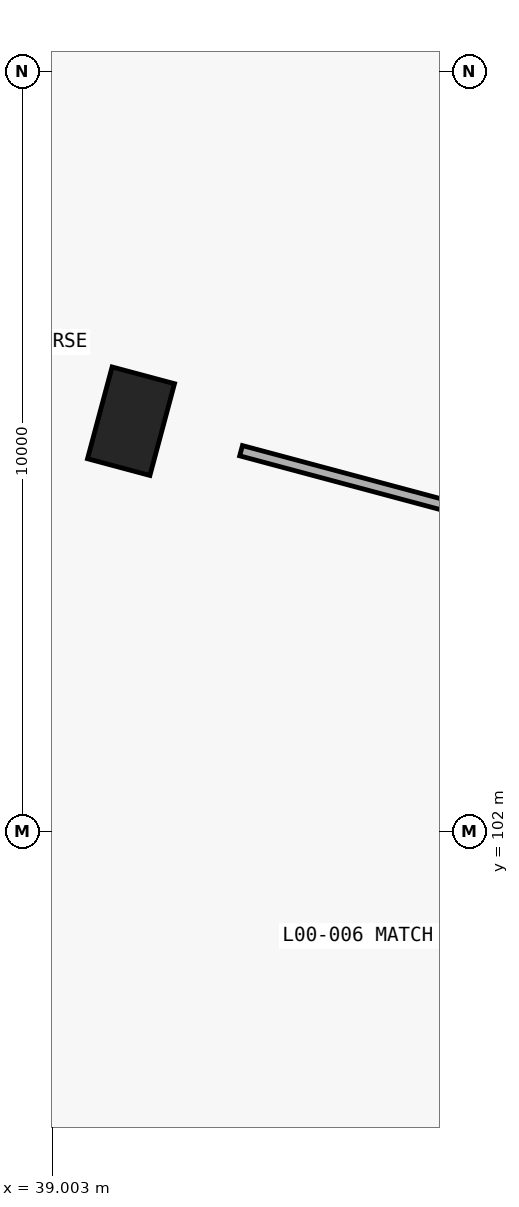
"""IFC4 building model, lengths in metres.
Left out: names, types, materials, properties, quantities, classifications, styles, units other than length and angle.
Written with IfcOpenShell. Run it as: python <this file> out.ifc"""

import sys

from ifc_helpers import new_model, si_unit, direction, frame, frame_2d, origin, origin_2d, place, context, subcontext, project, spatial, rectangle, extrude, element, save


model = new_model("IFC4")
c1 = context("Model", 3, precision=1e-05, world=origin(), true_north=direction((0.0, 1.0)))
c2 = subcontext(c1, "Body", "Model", "MODEL_VIEW")
j1 = project(units=[si_unit("LENGTHUNIT", "METRE"), si_unit("PLANEANGLEUNIT", "RADIAN")], contexts=[c1])
p1 = place(None, origin())
s1 = spatial("IfcSite", under=j1, at=p1, CompositionType="ELEMENT")
p2 = place(p1, origin())
s2 = spatial("IfcBuilding", under=s1, at=p2, CompositionType="ELEMENT")
p3 = place(p2, origin())
s3 = spatial("IfcBuildingStorey", under=s2, at=p3, CompositionType="ELEMENT", Elevation=0.0)
p4 = place(p3, frame((40.039, 107.4, 0.0), z_axis=(0.0, 0.0, 1.0), x_axis=(-0.965925826289, 0.258819045103, 0.0)))
e1 = element("IfcColumn", 1, at=p4, inside=s3, PredefinedType="COLUMN", context=c2, shape_type="SweptSolid", body=[
    extrude(rectangle(XDim=0.85, YDim=1.25, at=origin_2d()), origin(), (0.0, 0.0, 1.0), 5.4),
])
p5 = place(p3, frame((52.402, 104.087, 0.0), z_axis=(0.0, 0.0, 1.0), x_axis=(-0.965917575353, 0.258849836054, 0.0)))
e2 = element("IfcWall", 2, at=p5, inside=s3, PredefinedType="PARTITIONING", context=c2, shape_type="SweptSolid", body=[
    extrude(rectangle(XDim=11.3, YDim=0.14, at=frame_2d((5.65, 0.0))), origin(), (0.0, 0.0, 1.0), 5.08),
])
save(model, sys.argv[1])
